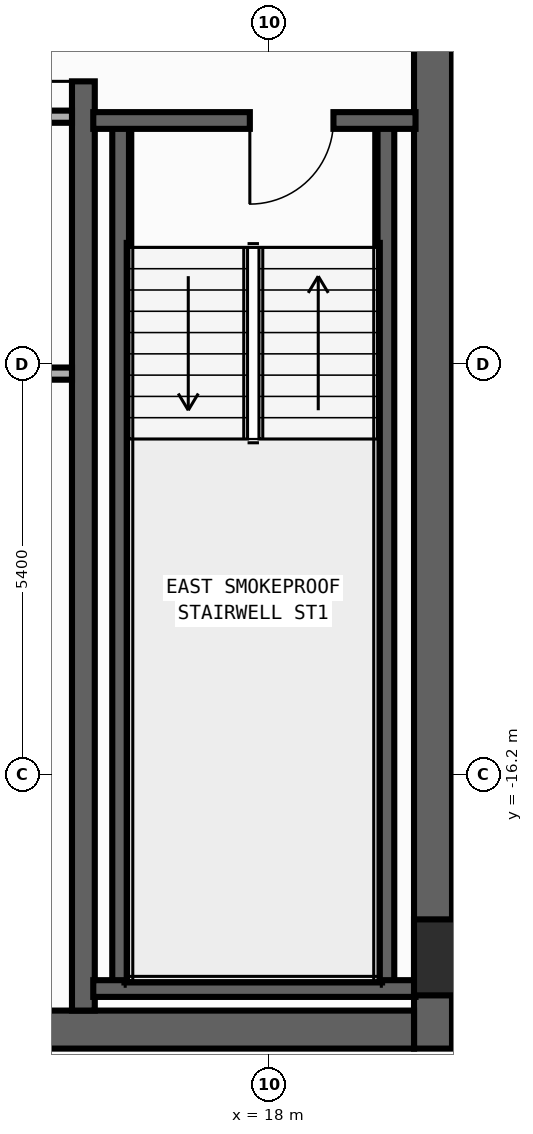
"""IFC4 building model, lengths in metres.
Left out: names, types, materials, properties, quantities, classifications, styles, units other than length and angle.
Written with IfcOpenShell. Run it as: python <this file> out.ifc"""

import sys

from ifc_helpers import new_model, si_unit, direction, frame, frame_2d, origin, origin_2d, place, context, subcontext, project, spatial, rectangle, circle, extrude, element, fill, save


model = new_model("IFC4")
c1 = context("Model", 3, precision=1e-05, world=origin(), true_north=direction((0.0, 1.0)))
c2 = subcontext(c1, "Body", "Model", "MODEL_VIEW")
j1 = project(units=[si_unit("LENGTHUNIT", "METRE"), si_unit("PLANEANGLEUNIT", "RADIAN")], contexts=[c1])
p1 = place(None, origin())
s1 = spatial("IfcSite", under=j1, at=p1, CompositionType="ELEMENT")
p2 = place(p1, origin())
s2 = spatial("IfcBuilding", under=s1, at=p2, CompositionType="ELEMENT")
p3 = place(p2, frame((0.0, 0.0, 285.2)))
s3 = spatial("IfcBuildingStorey", under=s2, at=p3, CompositionType="ELEMENT", Elevation=285.2)
p4 = place(p3, frame((20.15, -19.8, 0.0), z_axis=(0.0, 0.0, 1.0), x_axis=(0.0, 1.0, 0.0)))
e1 = element("IfcWall", 1, at=p4, inside=s3, PredefinedType="SHEAR", context=c2, shape_type="SweptSolid", body=[
    extrude(rectangle(XDim=27.0, YDim=0.5, at=frame_2d((13.5, 0.0))), origin(), (0.0, 0.0, 1.0), 3.54),
])
p5 = place(p3, frame((12.5, -19.55, 0.0), z_axis=(0.0, 0.0, 1.0), x_axis=(1.0, 0.0, 0.0)))
e2 = element("IfcWall", 2, at=p5, inside=s3, PredefinedType="SHEAR", context=c2, shape_type="SweptSolid", body=[
    extrude(rectangle(XDim=7.4, YDim=0.5, at=frame_2d((3.7, 0.0))), origin(), (0.0, 0.0, 1.0), 3.54),
])
p6 = place(p3, frame((15.55, -19.3, 0.0), z_axis=(0.0, 0.0, 1.0), x_axis=(0.0, 1.0, 0.0)))
e3 = element("IfcWall", 3, at=p6, inside=s3, PredefinedType="SHEAR", context=c2, shape_type="SweptSolid", body=[
    extrude(rectangle(XDim=26.0, YDim=0.3, at=frame_2d((13.0, 0.0))), origin(), (0.0, 0.0, 1.0), 3.54),
])
p7 = place(p6, frame((12.225, 0.0, 0.0)))
e4 = element("IfcOpeningElement", 4, at=p7, cuts=e3, PredefinedType="OPENING", context=c2, shape_type="SweptSolid", body=[
    extrude(rectangle(XDim=1.15, YDim=2.2, at=frame_2d((0.575, 1.1))), frame((0.0, 0.16, 0.0), z_axis=(0.0, -1.0, 0.0), x_axis=(1.0, 0.0, 0.0)), (0.0, 0.0, 1.0), 0.32),
])
p8 = place(p6, frame((24.625, 0.0, 0.0)))
e5 = element("IfcOpeningElement", 5, at=p8, cuts=e3, PredefinedType="OPENING", context=c2, shape_type="SweptSolid", body=[
    extrude(rectangle(XDim=0.85, YDim=2.1, at=frame_2d((0.425, 1.05))), frame((0.0, 0.16, 0.0), z_axis=(0.0, -1.0, 0.0), x_axis=(1.0, 0.0, 0.0)), (0.0, 0.0, 1.0), 0.32),
])
for number, where, z_axis, x_axis in (
    (6, (16.04, -19.01, 0.0), (0.0, 0.0, 1.0), (0.0, 1.0, 0.0)),
    (7, (19.53, -19.01, 0.0), (0.0, 0.0, 1.0), (0.0, 1.0, 0.0)),
):
    element("IfcWall", number, at=place(p3, frame(where, z_axis=z_axis, x_axis=x_axis)), inside=s3, PredefinedType="SHEAR", context=c2, shape_type="SweptSolid", body=[
        extrude(rectangle(XDim=11.42, YDim=0.22, at=frame_2d((5.71, 0.0))), origin(), (0.0, 0.0, 1.0), 3.54),
    ])
p9 = place(p3, frame((15.68, -19.01, 0.0), z_axis=(0.0, 0.0, 1.0), x_axis=(1.0, 0.0, 0.0)))
e8 = element("IfcWall", 8, at=p9, inside=s3, PredefinedType="SHEAR", context=c2, shape_type="SweptSolid", body=[
    extrude(rectangle(XDim=4.24, YDim=0.22, at=frame_2d((2.12, 0.0))), origin(), (0.0, 0.0, 1.0), 3.54),
])
p10 = place(p3, frame((19.92, -7.59, 0.0), z_axis=(0.0, 0.0, 1.0), x_axis=(-1.0, 0.0, 0.0)))
e9 = element("IfcWall", 9, at=p10, inside=s3, PredefinedType="SHEAR", context=c2, shape_type="SweptSolid", body=[
    extrude(rectangle(XDim=4.24, YDim=0.22, at=frame_2d((2.12, 0.0))), origin(), (0.0, 0.0, 1.0), 3.54),
])
p11 = place(p10, frame((1.08, 0.0, 0.0)))
e10 = element("IfcOpeningElement", 10, at=p11, cuts=e9, PredefinedType="OPENING", context=c2, shape_type="SweptSolid", body=[
    extrude(rectangle(XDim=1.1, YDim=2.2, at=frame_2d((0.55, 1.1))), frame((0.0, 0.12, 0.0), z_axis=(0.0, -1.0, 0.0), x_axis=(1.0, 0.0, 0.0)), (0.0, 0.0, 1.0), 0.24),
])
p12 = place(p3, frame((20.4, -18.6, 0.0), z_axis=(0.0, 0.0, 1.0), x_axis=(1.0, 0.0, 0.0)))
e11 = element("IfcColumn", 11, at=p12, inside=s3, PredefinedType="COLUMN", context=c2, shape_type="SweptSolid", body=[
    extrude(circle(Radius=0.5, at=origin_2d()), origin(), (0.0, 0.0, 1.0), 3.8),
])
p13 = place(p3, frame((12.8, -7.54, 0.0), z_axis=(0.0, 0.0, 1.0), x_axis=(1.0, 0.0, 0.0)))
e12 = element("IfcWall", 12, at=p13, inside=s3, PredefinedType="STANDARD", context=c2, shape_type="SweptSolid", body=[
    extrude(rectangle(XDim=2.6, YDim=0.16, at=frame_2d((1.3, 0.0))), origin(), (0.0, 0.0, 1.0), 3.54),
])
p14 = place(p3, frame((12.5, -10.92, 0.0), z_axis=(0.0, 0.0, 1.0), x_axis=(1.0, 0.0, 0.0)))
e13 = element("IfcWall", 13, at=p14, inside=s3, PredefinedType="PARTITIONING", context=c2, shape_type="SweptSolid", body=[
    extrude(rectangle(XDim=2.9, YDim=0.16, at=frame_2d((1.45, 0.0))), origin(), (0.0, 0.0, 1.0), 2.64),
])
p15 = place(p11, origin())
e14 = element("IfcDoor", 14, at=p15, inside=s3, OperationType="SINGLE_SWING_RIGHT", PredefinedType="DOOR", context=c2, shape_type="SweptSolid", body=[
    extrude(rectangle(XDim=1.1, YDim=2.2, at=frame_2d((0.55, 1.1))), frame((0.0, 0.025, 0.0), z_axis=(0.0, -1.0, 0.0), x_axis=(1.0, 0.0, 0.0)), (0.0, 0.0, 1.0), 0.05),
])
fill(e10, e14)
p16 = place(p7, origin())
e15 = element("IfcDoor", 15, at=p16, inside=s3, OperationType="SINGLE_SWING_LEFT", PredefinedType="DOOR", context=c2, shape_type="SweptSolid", body=[
    extrude(rectangle(XDim=1.15, YDim=2.2, at=frame_2d((0.575, 1.1))), frame((0.0, 0.025, 0.0), z_axis=(0.0, -1.0, 0.0), x_axis=(1.0, 0.0, 0.0)), (0.0, 0.0, 1.0), 0.05),
])
fill(e4, e15)
save(model, sys.argv[1])
